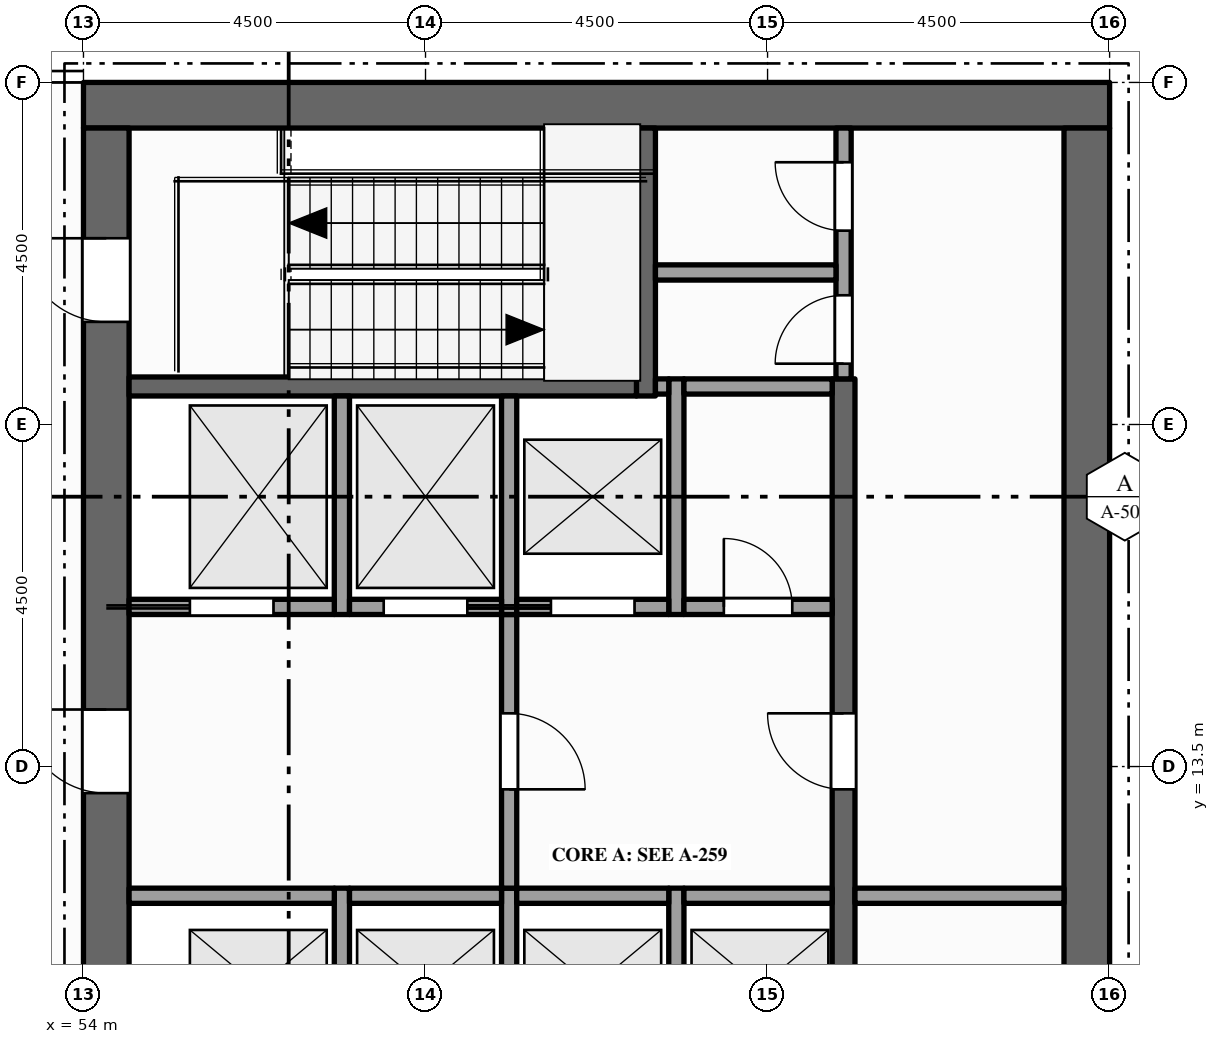
"""IFC4 building model, lengths in metres.
Left out: names, types, materials, properties, quantities, classifications, styles, units other than length and angle.
Written with IfcOpenShell. Run it as: python <this file> out.ifc"""

import sys

from ifc_helpers import new_model, si_unit, direction, frame, frame_2d, origin, place, context, subcontext, project, spatial, rectangle, extrude, element, fill, save


model = new_model("IFC4")
c1 = context("Model", 3, precision=1e-05, world=origin(), true_north=direction((0.0, 1.0)))
c2 = subcontext(c1, "Body", "Model", "MODEL_VIEW")
j1 = project(units=[si_unit("LENGTHUNIT", "METRE"), si_unit("PLANEANGLEUNIT", "RADIAN")], contexts=[c1])
p1 = place(None, origin())
s1 = spatial("IfcSite", under=j1, at=p1, CompositionType="ELEMENT")
p2 = place(p1, origin())
s2 = spatial("IfcBuilding", under=s1, at=p2, CompositionType="ELEMENT")
p3 = place(p2, frame((0.0, 0.0, 327.5)))
s3 = spatial("IfcBuildingStorey", under=s2, at=p3, CompositionType="ELEMENT", Elevation=327.5)
p4 = place(p3, frame((54.0, 22.2, -0.15), z_axis=(0.0, 0.0, 1.0), x_axis=(1.0, 0.0, 0.0)))
e1 = element("IfcWall", 1, at=p4, inside=s3, PredefinedType="SHEAR", context=c2, shape_type="SweptSolid", body=[
    extrude(rectangle(XDim=13.5, YDim=0.6, at=frame_2d((6.75, 0.0))), origin(), (0.0, 0.0, 1.0), 4.5),
])
p5 = place(p3, frame((54.3, 0.6, -0.15), z_axis=(0.0, 0.0, 1.0), x_axis=(0.0, 1.0, 0.0)))
e2 = element("IfcWall", 2, at=p5, inside=s3, PredefinedType="SHEAR", context=c2, shape_type="SweptSolid", body=[
    extrude(rectangle(XDim=21.3, YDim=0.6, at=frame_2d((10.65, 0.0))), origin(), (0.0, 0.0, 1.0), 4.5),
])
p6 = place(p5, frame((6.5, 0.0, 0.15)))
e3 = element("IfcOpeningElement", 3, at=p6, cuts=e2, PredefinedType="OPENING", context=c2, shape_type="SweptSolid", body=[
    extrude(rectangle(XDim=1.8, YDim=2.1, at=frame_2d((0.9, 1.05))), frame((0.0, 0.31, 0.0), z_axis=(0.0, -1.0, 0.0), x_axis=(1.0, 0.0, 0.0)), (0.0, 0.0, 1.0), 0.62),
])
p7 = place(p5, frame((12.55, 0.0, 0.15)))
e4 = element("IfcOpeningElement", 4, at=p7, cuts=e2, PredefinedType="OPENING", context=c2, shape_type="SweptSolid", body=[
    extrude(rectangle(XDim=1.1, YDim=2.1, at=frame_2d((0.55, 1.05))), frame((0.0, 0.31, 0.0), z_axis=(0.0, -1.0, 0.0), x_axis=(1.0, 0.0, 0.0)), (0.0, 0.0, 1.0), 0.62),
])
p8 = place(p5, frame((1.55, 0.0, 0.15)))
e5 = element("IfcOpeningElement", 5, at=p8, cuts=e2, PredefinedType="OPENING", context=c2, shape_type="SweptSolid", body=[
    extrude(rectangle(XDim=1.1, YDim=2.1, at=frame_2d((0.55, 1.05))), frame((0.0, 0.31, 0.0), z_axis=(0.0, -1.0, 0.0), x_axis=(1.0, 0.0, 0.0)), (0.0, 0.0, 1.0), 0.62),
])
p9 = place(p5, frame((18.75, 0.0, 0.15)))
e6 = element("IfcOpeningElement", 6, at=p9, cuts=e2, PredefinedType="OPENING", context=c2, shape_type="SweptSolid", body=[
    extrude(rectangle(XDim=1.1, YDim=2.1, at=frame_2d((0.55, 1.05))), frame((0.0, 0.31, 0.0), z_axis=(0.0, -1.0, 0.0), x_axis=(1.0, 0.0, 0.0)), (0.0, 0.0, 1.0), 0.62),
])
p10 = place(p3, frame((67.2, 0.6, -0.15), z_axis=(0.0, 0.0, 1.0), x_axis=(0.0, 1.0, 0.0)))
e7 = element("IfcWall", 7, at=p10, inside=s3, PredefinedType="SHEAR", context=c2, shape_type="SweptSolid", body=[
    extrude(rectangle(XDim=21.3, YDim=0.6, at=frame_2d((10.65, 0.0))), origin(), (0.0, 0.0, 1.0), 4.5),
])
p11 = place(p3, frame((57.4, 9.3, 0.0), z_axis=(0.0, 0.0, 1.0), x_axis=(0.0, 1.0, 0.0)))
e8 = element("IfcWall", 8, at=p11, inside=s3, PredefinedType="SOLIDWALL", context=c2, shape_type="SweptSolid", body=[
    extrude(rectangle(XDim=2.6, YDim=0.2, at=frame_2d((1.3, 0.0))), origin(), (0.0, 0.0, 1.0), 4.35),
])
p12 = place(p3, frame((57.4, 15.5, 0.0), z_axis=(0.0, 0.0, 1.0), x_axis=(0.0, 1.0, 0.0)))
e9 = element("IfcWall", 9, at=p12, inside=s3, PredefinedType="SOLIDWALL", context=c2, shape_type="SweptSolid", body=[
    extrude(rectangle(XDim=2.875, YDim=0.2, at=frame_2d((1.438, 0.0))), origin(), (0.0, 0.0, 1.0), 4.35),
])
p13 = place(p3, frame((59.6, 9.3, 0.0), z_axis=(0.0, 0.0, 1.0), x_axis=(0.0, 1.0, 0.0)))
e10 = element("IfcWall", 10, at=p13, inside=s3, PredefinedType="SOLIDWALL", context=c2, shape_type="SweptSolid", body=[
    extrude(rectangle(XDim=2.6, YDim=0.2, at=frame_2d((1.3, 0.0))), origin(), (0.0, 0.0, 1.0), 4.35),
])
p14 = place(p3, frame((59.6, 11.9, 0.0), z_axis=(0.0, 0.0, 1.0), x_axis=(0.0, 1.0, 0.0)))
e11 = element("IfcWall", 11, at=p14, inside=s3, PredefinedType="PARTITIONING", context=c2, shape_type="SweptSolid", body=[
    extrude(rectangle(XDim=3.6, YDim=0.2, at=frame_2d((1.8, 0.0))), origin(), (0.0, 0.0, 1.0), 4.35),
])
p15 = place(p14, frame((1.3, 0.0, 0.0)))
e12 = element("IfcOpeningElement", 12, at=p15, cuts=e11, PredefinedType="OPENING", context=c2, shape_type="SweptSolid", body=[
    extrude(rectangle(XDim=1.0, YDim=2.1, at=frame_2d((0.5, 1.05))), frame((0.0, 0.11, 0.0), z_axis=(0.0, -1.0, 0.0), x_axis=(1.0, 0.0, 0.0)), (0.0, 0.0, 1.0), 0.22),
])
p16 = place(p3, frame((59.6, 15.5, 0.0), z_axis=(0.0, 0.0, 1.0), x_axis=(0.0, 1.0, 0.0)))
e13 = element("IfcWall", 13, at=p16, inside=s3, PredefinedType="SOLIDWALL", context=c2, shape_type="SweptSolid", body=[
    extrude(rectangle(XDim=2.875, YDim=0.2, at=frame_2d((1.438, 0.0))), origin(), (0.0, 0.0, 1.0), 4.35),
])
p17 = place(p3, frame((61.4, 18.375, 0.0), z_axis=(0.0, 0.0, 1.0), x_axis=(0.0, 1.0, 0.0)))
e14 = element("IfcWall", 14, at=p17, inside=s3, PredefinedType="SHEAR", context=c2, shape_type="SweptSolid", body=[
    extrude(rectangle(XDim=3.525, YDim=0.25, at=frame_2d((1.762, 0.0))), origin(), (0.0, 0.0, 1.0), 4.35),
])
p18 = place(p3, frame((61.8, 9.3, 0.0), z_axis=(0.0, 0.0, 1.0), x_axis=(0.0, 1.0, 0.0)))
e15 = element("IfcWall", 15, at=p18, inside=s3, PredefinedType="SOLIDWALL", context=c2, shape_type="SweptSolid", body=[
    extrude(rectangle(XDim=2.6, YDim=0.2, at=frame_2d((1.3, 0.0))), origin(), (0.0, 0.0, 1.0), 4.35),
])
p19 = place(p3, frame((61.8, 15.5, 0.0), z_axis=(0.0, 0.0, 1.0), x_axis=(0.0, 1.0, 0.0)))
e16 = element("IfcWall", 16, at=p19, inside=s3, PredefinedType="SOLIDWALL", context=c2, shape_type="SweptSolid", body=[
    extrude(rectangle(XDim=3.1, YDim=0.2, at=frame_2d((1.55, 0.0))), origin(), (0.0, 0.0, 1.0), 4.35),
])
p20 = place(p3, frame((64.0, 4.1, 0.0), z_axis=(0.0, 0.0, 1.0), x_axis=(0.0, 1.0, 0.0)))
e17 = element("IfcWall", 17, at=p20, inside=s3, PredefinedType="SHEAR", context=c2, shape_type="SweptSolid", body=[
    extrude(rectangle(XDim=14.5, YDim=0.3, at=frame_2d((7.25, 0.0))), origin(), (0.0, 0.0, 1.0), 4.35),
])
p21 = place(p20, frame((3.4, 0.0, 0.0)))
e18 = element("IfcOpeningElement", 18, at=p21, cuts=e17, PredefinedType="OPENING", context=c2, shape_type="SweptSolid", body=[
    extrude(rectangle(XDim=1.0, YDim=2.1, at=frame_2d((0.5, 1.05))), frame((0.0, 0.16, 0.0), z_axis=(0.0, -1.0, 0.0), x_axis=(1.0, 0.0, 0.0)), (0.0, 0.0, 1.0), 0.32),
])
p22 = place(p20, frame((9.1, 0.0, 0.0)))
e19 = element("IfcOpeningElement", 19, at=p22, cuts=e17, PredefinedType="OPENING", context=c2, shape_type="SweptSolid", body=[
    extrude(rectangle(XDim=1.0, YDim=2.1, at=frame_2d((0.5, 1.05))), frame((0.0, 0.16, 0.0), z_axis=(0.0, -1.0, 0.0), x_axis=(1.0, 0.0, 0.0)), (0.0, 0.0, 1.0), 0.32),
])
p23 = place(p3, frame((64.0, 18.6, 0.0), z_axis=(0.0, 0.0, 1.0), x_axis=(0.0, 1.0, 0.0)))
e20 = element("IfcWall", 20, at=p23, inside=s3, PredefinedType="PARTITIONING", context=c2, shape_type="SweptSolid", body=[
    extrude(rectangle(XDim=3.3, YDim=0.2, at=frame_2d((1.65, 0.0))), origin(), (0.0, 0.0, 1.0), 4.35),
])
p24 = place(p23, frame((0.2, 0.0, 0.0)))
e21 = element("IfcOpeningElement", 21, at=p24, cuts=e20, PredefinedType="OPENING", context=c2, shape_type="SweptSolid", body=[
    extrude(rectangle(XDim=0.9, YDim=2.1, at=frame_2d((0.45, 1.05))), frame((0.0, 0.11, 0.0), z_axis=(0.0, -1.0, 0.0), x_axis=(1.0, 0.0, 0.0)), (0.0, 0.0, 1.0), 0.22),
])
p25 = place(p23, frame((1.95, 0.0, 0.0)))
e22 = element("IfcOpeningElement", 22, at=p25, cuts=e20, PredefinedType="OPENING", context=c2, shape_type="SweptSolid", body=[
    extrude(rectangle(XDim=0.9, YDim=2.1, at=frame_2d((0.45, 1.05))), frame((0.0, 0.11, 0.0), z_axis=(0.0, -1.0, 0.0), x_axis=(1.0, 0.0, 0.0)), (0.0, 0.0, 1.0), 0.22),
])
p26 = place(p3, frame((54.6, 11.8, 0.0), z_axis=(0.0, 0.0, 1.0), x_axis=(1.0, 0.0, 0.0)))
e23 = element("IfcWall", 23, at=p26, inside=s3, PredefinedType="SOLIDWALL", context=c2, shape_type="SweptSolid", body=[
    extrude(rectangle(XDim=2.7, YDim=0.2, at=frame_2d((1.35, 0.0))), origin(), (0.0, 0.0, 1.0), 4.35),
])
for number, where, z_axis, x_axis in (
    (24, (57.5, 11.8, 0.0), (0.0, 0.0, 1.0), (1.0, 0.0, 0.0)),
    (25, (59.7, 11.8, 0.0), (0.0, 0.0, 1.0), (1.0, 0.0, 0.0)),
):
    element("IfcWall", number, at=place(p3, frame(where, z_axis=z_axis, x_axis=x_axis)), inside=s3, PredefinedType="SOLIDWALL", context=c2, shape_type="SweptSolid", body=[
        extrude(rectangle(XDim=2.0, YDim=0.2, at=frame_2d((1.0, 0.0))), origin(), (0.0, 0.0, 1.0), 4.35),
    ])
p27 = place(p3, frame((61.9, 11.8, 0.0), z_axis=(0.0, 0.0, 1.0), x_axis=(1.0, 0.0, 0.0)))
e26 = element("IfcWall", 26, at=p27, inside=s3, PredefinedType="SOLIDWALL", context=c2, shape_type="SweptSolid", body=[
    extrude(rectangle(XDim=1.95, YDim=0.2, at=frame_2d((0.975, 0.0))), origin(), (0.0, 0.0, 1.0), 4.35),
])
p28 = place(p3, frame((64.15, 11.8, 0.0), z_axis=(0.0, 0.0, 1.0), x_axis=(1.0, 0.0, 0.0)))
e27 = element("IfcWall", 27, at=p28, inside=s3, PredefinedType="PARTITIONING", context=c2, shape_type="SweptSolid", body=[
    extrude(rectangle(XDim=2.75, YDim=0.2, at=frame_2d((1.375, 0.0))), origin(), (0.0, 0.0, 1.0), 4.35),
])
p29 = place(p3, frame((54.6, 15.6, 0.0), z_axis=(0.0, 0.0, 1.0), x_axis=(1.0, 0.0, 0.0)))
e28 = element("IfcWall", 28, at=p29, inside=s3, PredefinedType="SOLIDWALL", context=c2, shape_type="SweptSolid", body=[
    extrude(rectangle(XDim=2.7, YDim=0.2, at=frame_2d((1.35, 0.0))), origin(), (0.0, 0.0, 1.0), 4.35),
])
p30 = place(p29, frame((0.8, 0.0, 0.012)))
e29 = element("IfcOpeningElement", 29, at=p30, cuts=e28, PredefinedType="OPENING", context=c2, shape_type="SweptSolid", body=[
    extrude(rectangle(XDim=1.1, YDim=2.1, at=frame_2d((0.55, 1.05))), frame((0.0, 0.11, 0.0), z_axis=(0.0, -1.0, 0.0), x_axis=(1.0, 0.0, 0.0)), (0.0, 0.0, 1.0), 0.22),
])
p31 = place(p3, frame((57.5, 15.6, 0.0), z_axis=(0.0, 0.0, 1.0), x_axis=(1.0, 0.0, 0.0)))
e30 = element("IfcWall", 30, at=p31, inside=s3, PredefinedType="SOLIDWALL", context=c2, shape_type="SweptSolid", body=[
    extrude(rectangle(XDim=2.0, YDim=0.2, at=frame_2d((1.0, 0.0))), origin(), (0.0, 0.0, 1.0), 4.35),
])
p32 = place(p31, frame((0.45, 0.0, 0.012)))
e31 = element("IfcOpeningElement", 31, at=p32, cuts=e30, PredefinedType="OPENING", context=c2, shape_type="SweptSolid", body=[
    extrude(rectangle(XDim=1.1, YDim=2.1, at=frame_2d((0.55, 1.05))), frame((0.0, 0.11, 0.0), z_axis=(0.0, -1.0, 0.0), x_axis=(1.0, 0.0, 0.0)), (0.0, 0.0, 1.0), 0.22),
])
p33 = place(p3, frame((59.7, 15.6, 0.0), z_axis=(0.0, 0.0, 1.0), x_axis=(1.0, 0.0, 0.0)))
e32 = element("IfcWall", 32, at=p33, inside=s3, PredefinedType="SOLIDWALL", context=c2, shape_type="SweptSolid", body=[
    extrude(rectangle(XDim=2.0, YDim=0.2, at=frame_2d((1.0, 0.0))), origin(), (0.0, 0.0, 1.0), 4.35),
])
p34 = place(p33, frame((0.45, 0.0, 0.012)))
e33 = element("IfcOpeningElement", 33, at=p34, cuts=e32, PredefinedType="OPENING", context=c2, shape_type="SweptSolid", body=[
    extrude(rectangle(XDim=1.1, YDim=2.1, at=frame_2d((0.55, 1.05))), frame((0.0, 0.11, 0.0), z_axis=(0.0, -1.0, 0.0), x_axis=(1.0, 0.0, 0.0)), (0.0, 0.0, 1.0), 0.22),
])
p35 = place(p3, frame((61.9, 15.6, 0.0), z_axis=(0.0, 0.0, 1.0), x_axis=(1.0, 0.0, 0.0)))
e34 = element("IfcWall", 34, at=p35, inside=s3, PredefinedType="PARTITIONING", context=c2, shape_type="SweptSolid", body=[
    extrude(rectangle(XDim=1.95, YDim=0.2, at=frame_2d((0.975, 0.0))), origin(), (0.0, 0.0, 1.0), 4.35),
])
p36 = place(p35, frame((0.525, 0.0, 0.0)))
e35 = element("IfcOpeningElement", 35, at=p36, cuts=e34, PredefinedType="OPENING", context=c2, shape_type="SweptSolid", body=[
    extrude(rectangle(XDim=0.9, YDim=2.1, at=frame_2d((0.45, 1.05))), frame((0.0, 0.11, 0.0), z_axis=(0.0, -1.0, 0.0), x_axis=(1.0, 0.0, 0.0)), (0.0, 0.0, 1.0), 0.22),
])
p37 = place(p3, frame((54.6, 18.5, 0.0), z_axis=(0.0, 0.0, 1.0), x_axis=(1.0, 0.0, 0.0)))
e36 = element("IfcWall", 36, at=p37, inside=s3, PredefinedType="SHEAR", context=c2, shape_type="SweptSolid", body=[
    extrude(rectangle(XDim=6.675, YDim=0.25, at=frame_2d((3.337, 0.0))), origin(), (0.0, 0.0, 1.0), 4.35),
])
p38 = place(p3, frame((61.525, 18.5, 0.0), z_axis=(0.0, 0.0, 1.0), x_axis=(1.0, 0.0, 0.0)))
e37 = element("IfcWall", 37, at=p38, inside=s3, PredefinedType="SOLIDWALL", context=c2, shape_type="SweptSolid", body=[
    extrude(rectangle(XDim=0.175, YDim=0.2, at=frame_2d((0.087, 0.0))), origin(), (0.0, 0.0, 1.0), 4.35),
])
p39 = place(p3, frame((61.9, 18.5, 0.0), z_axis=(0.0, 0.0, 1.0), x_axis=(1.0, 0.0, 0.0)))
e38 = element("IfcWall", 38, at=p39, inside=s3, PredefinedType="PARTITIONING", context=c2, shape_type="SweptSolid", body=[
    extrude(rectangle(XDim=1.95, YDim=0.2, at=frame_2d((0.975, 0.0))), origin(), (0.0, 0.0, 1.0), 4.35),
])
p40 = place(p3, frame((61.525, 20.0, 0.0), z_axis=(0.0, 0.0, 1.0), x_axis=(1.0, 0.0, 0.0)))
e39 = element("IfcWall", 39, at=p40, inside=s3, PredefinedType="PARTITIONING", context=c2, shape_type="SweptSolid", body=[
    extrude(rectangle(XDim=2.375, YDim=0.2, at=frame_2d((1.188, 0.0))), origin(), (0.0, 0.0, 1.0), 4.35),
])
p41 = place(p30, origin())
e40 = element("IfcDoor", 40, at=p41, inside=s3, OperationType="SLIDING_TO_LEFT", PredefinedType="DOOR", context=c2, shape_type="SweptSolid", body=[
    extrude(rectangle(XDim=1.1, YDim=2.1, at=frame_2d((0.55, 1.05))), frame((0.0, 0.025, 0.0), z_axis=(0.0, -1.0, 0.0), x_axis=(1.0, 0.0, 0.0)), (0.0, 0.0, 1.0), 0.05),
])
fill(e29, e40)
p42 = place(p32, origin())
e41 = element("IfcDoor", 41, at=p42, inside=s3, OperationType="SLIDING_TO_RIGHT", PredefinedType="DOOR", context=c2, shape_type="SweptSolid", body=[
    extrude(rectangle(XDim=1.1, YDim=2.1, at=frame_2d((0.55, 1.05))), frame((0.0, 0.025, 0.0), z_axis=(0.0, -1.0, 0.0), x_axis=(1.0, 0.0, 0.0)), (0.0, 0.0, 1.0), 0.05),
])
fill(e31, e41)
p43 = place(p34, origin())
e42 = element("IfcDoor", 42, at=p43, inside=s3, OperationType="SLIDING_TO_LEFT", PredefinedType="DOOR", context=c2, shape_type="SweptSolid", body=[
    extrude(rectangle(XDim=1.1, YDim=2.1, at=frame_2d((0.55, 1.05))), frame((0.0, 0.025, 0.0), z_axis=(0.0, -1.0, 0.0), x_axis=(1.0, 0.0, 0.0)), (0.0, 0.0, 1.0), 0.05),
])
fill(e33, e42)
p44 = place(p7, origin())
e43 = element("IfcDoor", 43, at=p44, inside=s3, OperationType="SINGLE_SWING_RIGHT", PredefinedType="DOOR", context=c2, shape_type="SweptSolid", body=[
    extrude(rectangle(XDim=1.1, YDim=2.1, at=frame_2d((0.55, 1.05))), frame((0.0, 0.025, 0.0), z_axis=(0.0, -1.0, 0.0), x_axis=(1.0, 0.0, 0.0)), (0.0, 0.0, 1.0), 0.05),
])
fill(e4, e43)
p45 = place(p15, origin())
e44 = element("IfcDoor", 44, at=p45, inside=s3, OperationType="SINGLE_SWING_LEFT", PredefinedType="DOOR", context=c2, shape_type="SweptSolid", body=[
    extrude(rectangle(XDim=1.0, YDim=2.1, at=frame_2d((0.5, 1.05))), frame((0.0, 0.025, 0.0), z_axis=(0.0, -1.0, 0.0), x_axis=(1.0, 0.0, 0.0)), (0.0, 0.0, 1.0), 0.05),
])
fill(e12, e44)
p46 = place(p22, origin())
e45 = element("IfcDoor", 45, at=p46, inside=s3, OperationType="SINGLE_SWING_RIGHT", PredefinedType="DOOR", context=c2, shape_type="SweptSolid", body=[
    extrude(rectangle(XDim=1.0, YDim=2.1, at=frame_2d((0.5, 1.05))), frame((0.0, 0.025, 0.0), z_axis=(0.0, -1.0, 0.0), x_axis=(1.0, 0.0, 0.0)), (0.0, 0.0, 1.0), 0.05),
])
fill(e19, e45)
p47 = place(p9, origin())
e46 = element("IfcDoor", 46, at=p47, inside=s3, OperationType="SINGLE_SWING_RIGHT", PredefinedType="DOOR", context=c2, shape_type="SweptSolid", body=[
    extrude(rectangle(XDim=1.1, YDim=2.1, at=frame_2d((0.55, 1.05))), frame((0.0, 0.025, 0.0), z_axis=(0.0, -1.0, 0.0), x_axis=(1.0, 0.0, 0.0)), (0.0, 0.0, 1.0), 0.05),
])
fill(e6, e46)
p48 = place(p24, origin())
e47 = element("IfcDoor", 47, at=p48, inside=s3, OperationType="SINGLE_SWING_LEFT", PredefinedType="DOOR", context=c2, shape_type="SweptSolid", body=[
    extrude(rectangle(XDim=0.9, YDim=2.1, at=frame_2d((0.45, 1.05))), frame((0.0, 0.025, 0.0), z_axis=(0.0, -1.0, 0.0), x_axis=(1.0, 0.0, 0.0)), (0.0, 0.0, 1.0), 0.05),
])
fill(e21, e47)
p49 = place(p25, origin())
e48 = element("IfcDoor", 48, at=p49, inside=s3, OperationType="SINGLE_SWING_RIGHT", PredefinedType="DOOR", context=c2, shape_type="SweptSolid", body=[
    extrude(rectangle(XDim=0.9, YDim=2.1, at=frame_2d((0.45, 1.05))), frame((0.0, 0.025, 0.0), z_axis=(0.0, -1.0, 0.0), x_axis=(1.0, 0.0, 0.0)), (0.0, 0.0, 1.0), 0.05),
])
fill(e22, e48)
p50 = place(p36, origin())
e49 = element("IfcDoor", 49, at=p50, inside=s3, OperationType="SINGLE_SWING_LEFT", PredefinedType="DOOR", context=c2, shape_type="SweptSolid", body=[
    extrude(rectangle(XDim=0.9, YDim=2.1, at=frame_2d((0.45, 1.05))), frame((0.0, 0.025, 0.0), z_axis=(0.0, -1.0, 0.0), x_axis=(1.0, 0.0, 0.0)), (0.0, 0.0, 1.0), 0.05),
])
fill(e35, e49)
save(model, sys.argv[1])
